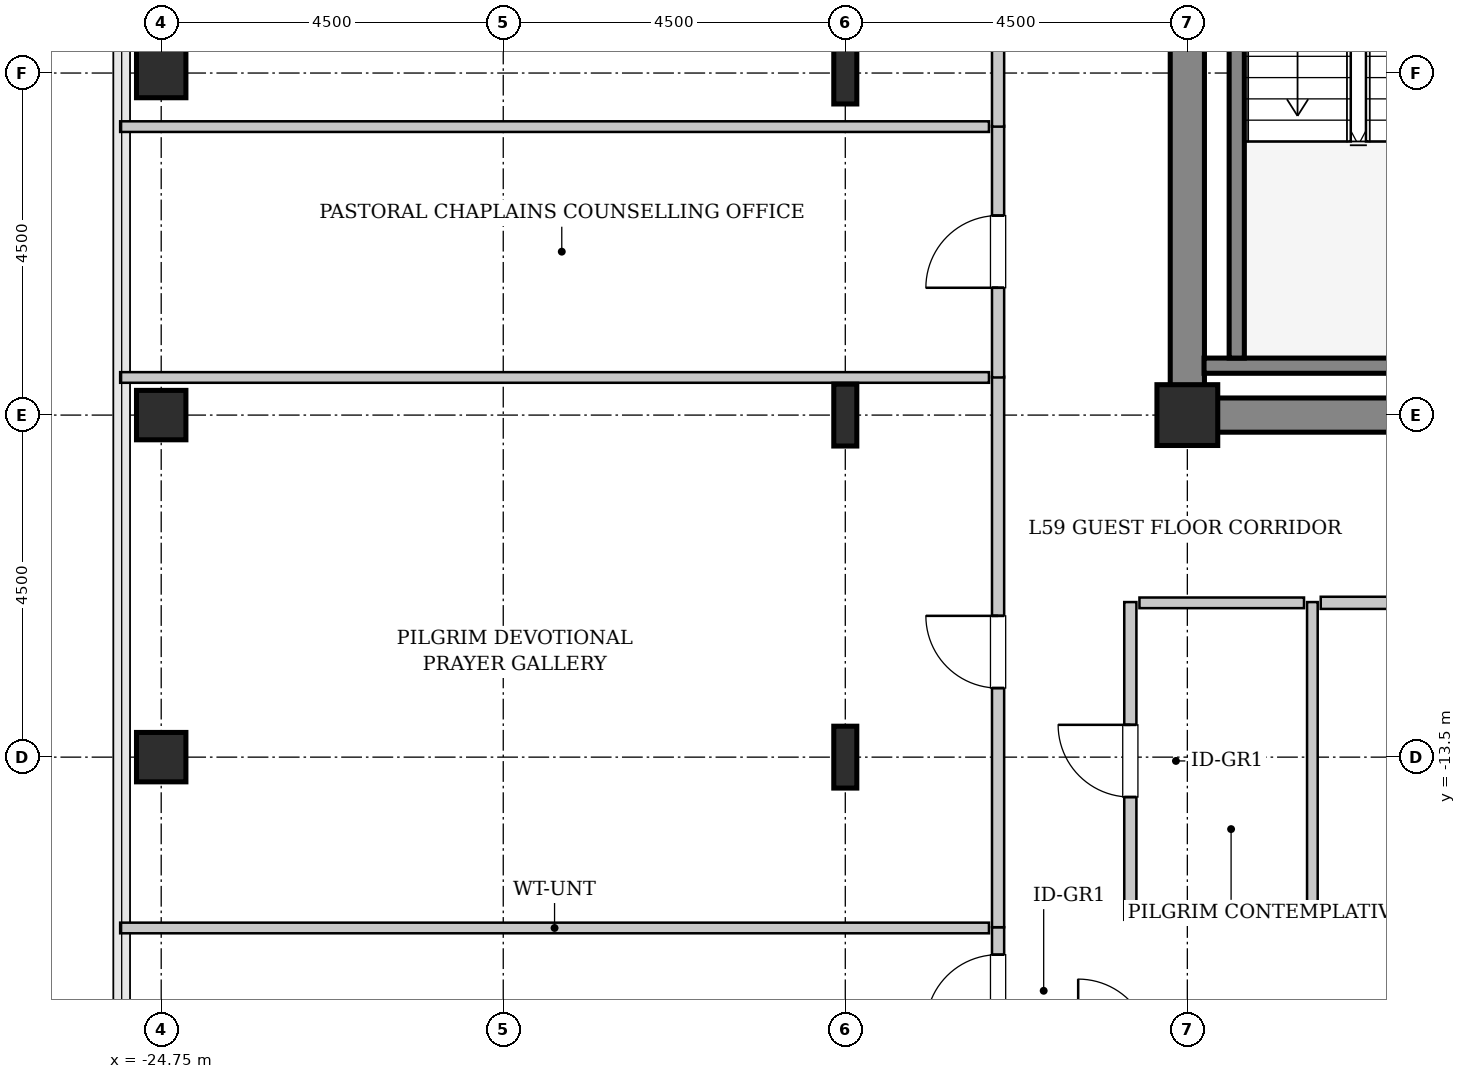
"""IFC4 building model, lengths in metres.
Left out: names, types, materials, properties, quantities, classifications, styles, units other than length and angle.
Written with IfcOpenShell. Run it as: python <this file> out.ifc"""

import sys

from ifc_helpers import new_model, si_unit, direction, frame, frame_2d, origin, origin_2d, place, context, subcontext, project, spatial, rectangle, hollow_rectangle, i_section, extrude, source, transform, mapped, element, fill, save


model = new_model("IFC4")
c1 = context("Model", 3, precision=1e-05, world=origin(), true_north=direction((0.0, 1.0)))
c2 = subcontext(c1, "Body", "Model", "MODEL_VIEW")
j1 = project(units=[si_unit("LENGTHUNIT", "METRE"), si_unit("PLANEANGLEUNIT", "RADIAN")], contexts=[c1])
p1 = place(None, origin())
s1 = spatial("IfcSite", under=j1, at=p1, CompositionType="ELEMENT")
p2 = place(p1, origin())
s2 = spatial("IfcBuilding", under=s1, at=p2, CompositionType="ELEMENT")
p3 = place(p2, frame((0.0, 0.0, 237.0)))
s3 = spatial("IfcBuildingStorey", under=s2, at=p3, CompositionType="ELEMENT", Elevation=237.0)
m1 = source(origin(), c2, "Body", "SweptSolid", [
    extrude(rectangle(XDim=9.925, YDim=0.45, at=frame_2d((4.962, 0.0))), origin(), (0.0, 0.0, 1.0), 3.8),
])
p4 = place(p3, frame((-11.475, -9.0, 0.0), z_axis=(0.0, 0.0, 1.0), x_axis=(1.0, 0.0, 0.0)))
e1 = element("IfcWall", 1, at=p4, inside=s3, PredefinedType="SHEAR", context=c2, shape_type="MappedRepresentation", body=[
    mapped(m1, transform((0.0, 0.0, 0.0), x_axis=(1.0, 0.0, 0.0), y_axis=(0.0, 1.0, 0.0), z_axis=(0.0, 0.0, 1.0), scale=1.0)),
])
m2 = source(origin(), c2, "Body", "SweptSolid", [
    extrude(rectangle(XDim=7.425, YDim=0.45, at=frame_2d((3.712, 0.0))), origin(), (0.0, 0.0, 1.0), 3.8),
])
p5 = place(p3, frame((-11.25, -8.775, 0.0), z_axis=(0.0, 0.0, 1.0), x_axis=(0.0, 1.0, 0.0)))
e2 = element("IfcWall", 2, at=p5, inside=s3, PredefinedType="SHEAR", context=c2, shape_type="MappedRepresentation", body=[
    mapped(m2, transform((0.0, 0.0, 0.0), x_axis=(1.0, 0.0, 0.0), y_axis=(0.0, 1.0, 0.0), z_axis=(0.0, 0.0, 1.0), scale=1.0)),
])
m3 = source(origin(), c2, "Body", "SweptSolid", [
    extrude(hollow_rectangle(XDim=0.65, YDim=0.65, WallThickness=0.032, InnerFilletRadius=0.032, OuterFilletRadius=0.064, at=origin_2d()), origin(), (0.0, 0.0, 1.0), 3.8),
])
for number, where, z_axis, x_axis in (
    (3, (-24.75, -13.5, 0.0), (0.0, 0.0, 1.0), (1.0, 0.0, 0.0)),
    (4, (-24.75, -9.0, 0.0), (0.0, 0.0, 1.0), (1.0, 0.0, 0.0)),
    (5, (-24.75, -4.5, 0.0), (0.0, 0.0, 1.0), (1.0, 0.0, 0.0)),
):
    element("IfcColumn", number, at=place(p3, frame(where, z_axis=z_axis, x_axis=x_axis)), inside=s3, PredefinedType="COLUMN", context=c2, shape_type="MappedRepresentation", body=[
        mapped(m3, transform((0.0, 0.0, 0.0), x_axis=(1.0, 0.0, 0.0), y_axis=(0.0, 1.0, 0.0), z_axis=(0.0, 0.0, 1.0), scale=1.0)),
    ])
m4 = source(origin(), c2, "Body", "SweptSolid", [
    extrude(i_section(OverallWidth=0.303, OverallDepth=0.814, WebThickness=0.021, FlangeThickness=0.04, FilletRadius=0.03, at=origin_2d()), origin(), (0.0, 0.0, 1.0), 3.8),
])
for number, where, z_axis, x_axis in (
    (6, (-15.75, -13.5, 0.0), (0.0, 0.0, 1.0), (1.0, 0.0, 0.0)),
    (7, (-15.75, -9.0, 0.0), (0.0, 0.0, 1.0), (1.0, 0.0, 0.0)),
    (8, (-15.75, -4.5, 0.0), (0.0, 0.0, 1.0), (1.0, 0.0, 0.0)),
):
    element("IfcColumn", number, at=place(p3, frame(where, z_axis=z_axis, x_axis=x_axis)), inside=s3, PredefinedType="COLUMN", context=c2, shape_type="MappedRepresentation", body=[
        mapped(m4, transform((0.0, 0.0, 0.0), x_axis=(1.0, 0.0, 0.0), y_axis=(0.0, 1.0, 0.0), z_axis=(0.0, 0.0, 1.0), scale=1.0)),
    ])
m5 = source(origin(), c2, "Body", "SweptSolid", [
    extrude(hollow_rectangle(XDim=0.8, YDim=0.8, WallThickness=0.04, InnerFilletRadius=0.04, OuterFilletRadius=0.08, at=origin_2d()), origin(), (0.0, 0.0, 1.0), 3.8),
])
p6 = place(p3, frame((-11.25, -9.0, 0.0), z_axis=(0.0, 0.0, 1.0), x_axis=(1.0, 0.0, 0.0)))
e9 = element("IfcColumn", 9, at=p6, inside=s3, PredefinedType="COLUMN", context=c2, shape_type="MappedRepresentation", body=[
    mapped(m5, transform((0.0, 0.0, 0.0), x_axis=(1.0, 0.0, 0.0), y_axis=(0.0, 1.0, 0.0), z_axis=(0.0, 0.0, 1.0), scale=1.0)),
])
m6 = source(origin(), c2, "Body", "SweptSolid", [
    extrude(rectangle(XDim=3.73, YDim=0.2, at=frame_2d((1.865, 0.0))), origin(), (0.0, 0.0, 1.0), 3.8),
])
p7 = place(p3, frame((-11.03, -8.35, 0.0), z_axis=(0.0, 0.0, 1.0), x_axis=(1.0, 0.0, 0.0)))
e10 = element("IfcWall", 10, at=p7, inside=s3, PredefinedType="SOLIDWALL", context=c2, shape_type="MappedRepresentation", body=[
    mapped(m6, transform((0.0, 0.0, 0.0), x_axis=(1.0, 0.0, 0.0), y_axis=(0.0, 1.0, 0.0), z_axis=(0.0, 0.0, 1.0), scale=1.0)),
])
m7 = source(origin(), c2, "Body", "SweptSolid", [
    extrude(rectangle(XDim=7.1, YDim=0.2, at=frame_2d((3.55, 0.0))), origin(), (0.0, 0.0, 1.0), 3.8),
])
p8 = place(p3, frame((-10.6, -1.15, 0.0), z_axis=(0.0, 0.0, 1.0), x_axis=(0.0, -1.0, 0.0)))
e11 = element("IfcWall", 11, at=p8, inside=s3, PredefinedType="SOLIDWALL", context=c2, shape_type="MappedRepresentation", body=[
    mapped(m7, transform((0.0, 0.0, 0.0), x_axis=(1.0, 0.0, 0.0), y_axis=(0.0, 1.0, 0.0), z_axis=(0.0, 0.0, 1.0), scale=1.0)),
])
m8 = source(origin(), c2, "Body", "SweptSolid", [
    extrude(rectangle(XDim=5.502, YDim=0.16, at=frame_2d((2.751, 0.0))), origin(), (0.0, 0.0, 1.0), 3.535),
])
p9 = place(p3, frame((-13.74, -21.24, 0.0), z_axis=(0.0, 0.0, 1.0), x_axis=(0.0, 1.0, 0.0)))
e12 = element("IfcWall", 12, at=p9, inside=s3, PredefinedType="PARTITIONING", context=c2, shape_type="MappedRepresentation", body=[
    mapped(m8, transform((0.0, 0.0, 0.0), x_axis=(1.0, 0.0, 0.0), y_axis=(0.0, 1.0, 0.0), z_axis=(0.0, 0.0, 1.0), scale=1.0)),
])
p10 = place(p9, frame((4.191, 0.0, 0.0)))
e13 = element("IfcOpeningElement", 13, at=p10, cuts=e12, PredefinedType="OPENING", context=c2, shape_type="SweptSolid", body=[
    extrude(rectangle(XDim=0.95, YDim=2.1, at=frame_2d((0.475, 1.05))), frame((0.0, 0.09, 0.0), z_axis=(0.0, -1.0, 0.0), x_axis=(1.0, 0.0, 0.0)), (0.0, 0.0, 1.0), 0.18),
])
m9 = source(origin(), c2, "Body", "SweptSolid", [
    extrude(rectangle(XDim=11.43, YDim=0.14, at=frame_2d((5.715, 0.0))), origin(), (0.0, 0.0, 1.0), 3.535),
])
p11 = place(p3, frame((-25.29, -15.748, 0.0), z_axis=(0.0, 0.0, 1.0), x_axis=(1.0, 0.0, 0.0)))
e14 = element("IfcWall", 14, at=p11, inside=s3, PredefinedType="PARTITIONING", context=c2, shape_type="MappedRepresentation", body=[
    mapped(m9, transform((0.0, 0.0, 0.0), x_axis=(1.0, 0.0, 0.0), y_axis=(0.0, 1.0, 0.0), z_axis=(0.0, 0.0, 1.0), scale=1.0)),
])
m10 = source(origin(), c2, "Body", "SweptSolid", [
    extrude(rectangle(XDim=7.242, YDim=0.16, at=frame_2d((3.621, 0.0))), origin(), (0.0, 0.0, 1.0), 3.535),
])
p12 = place(p3, frame((-13.74, -15.738, 0.0), z_axis=(0.0, 0.0, 1.0), x_axis=(0.0, 1.0, 0.0)))
e15 = element("IfcWall", 15, at=p12, inside=s3, PredefinedType="PARTITIONING", context=c2, shape_type="MappedRepresentation", body=[
    mapped(m10, transform((0.0, 0.0, 0.0), x_axis=(1.0, 0.0, 0.0), y_axis=(0.0, 1.0, 0.0), z_axis=(0.0, 0.0, 1.0), scale=1.0)),
])
p13 = place(p12, frame((3.146, 0.0, 0.0)))
e16 = element("IfcOpeningElement", 16, at=p13, cuts=e15, PredefinedType="OPENING", context=c2, shape_type="SweptSolid", body=[
    extrude(rectangle(XDim=0.95, YDim=2.1, at=frame_2d((0.475, 1.05))), frame((0.0, 0.09, 0.0), z_axis=(0.0, -1.0, 0.0), x_axis=(1.0, 0.0, 0.0)), (0.0, 0.0, 1.0), 0.18),
])
m11 = source(origin(), c2, "Body", "SweptSolid", [
    extrude(rectangle(XDim=11.43, YDim=0.14, at=frame_2d((5.715, 0.0))), origin(), (0.0, 0.0, 1.0), 2.925),
])
p14 = place(p3, frame((-25.29, -8.505, 0.0), z_axis=(0.0, 0.0, 1.0), x_axis=(1.0, 0.0, 0.0)))
e17 = element("IfcWall", 17, at=p14, inside=s3, PredefinedType="PARTITIONING", context=c2, shape_type="MappedRepresentation", body=[
    mapped(m11, transform((0.0, 0.0, 0.0), x_axis=(1.0, 0.0, 0.0), y_axis=(0.0, 1.0, 0.0), z_axis=(0.0, 0.0, 1.0), scale=1.0)),
])
m12 = source(origin(), c2, "Body", "SweptSolid", [
    extrude(rectangle(XDim=3.31, YDim=0.16, at=frame_2d((1.655, 0.0))), origin(), (0.0, 0.0, 1.0), 3.535),
])
p15 = place(p3, frame((-13.74, -8.505, 0.0), z_axis=(0.0, 0.0, 1.0), x_axis=(0.0, 1.0, 0.0)))
e18 = element("IfcWall", 18, at=p15, inside=s3, PredefinedType="PARTITIONING", context=c2, shape_type="MappedRepresentation", body=[
    mapped(m12, transform((0.0, 0.0, 0.0), x_axis=(1.0, 0.0, 0.0), y_axis=(0.0, 1.0, 0.0), z_axis=(0.0, 0.0, 1.0), scale=1.0)),
])
p16 = place(p15, frame((1.18, 0.0, 0.0)))
e19 = element("IfcOpeningElement", 19, at=p16, cuts=e18, PredefinedType="OPENING", context=c2, shape_type="SweptSolid", body=[
    extrude(rectangle(XDim=0.95, YDim=2.1, at=frame_2d((0.475, 1.05))), frame((0.0, 0.09, 0.0), z_axis=(0.0, -1.0, 0.0), x_axis=(1.0, 0.0, 0.0)), (0.0, 0.0, 1.0), 0.18),
])
p17 = place(p3, frame((-25.29, -5.205, 0.0), z_axis=(0.0, 0.0, 1.0), x_axis=(1.0, 0.0, 0.0)))
e20 = element("IfcWall", 20, at=p17, inside=s3, PredefinedType="PARTITIONING", context=c2, shape_type="MappedRepresentation", body=[
    mapped(m9, transform((0.0, 0.0, 0.0), x_axis=(1.0, 0.0, 0.0), y_axis=(0.0, 1.0, 0.0), z_axis=(0.0, 0.0, 1.0), scale=1.0)),
])
m13 = source(origin(), c2, "Body", "SweptSolid", [
    extrude(rectangle(XDim=10.31, YDim=0.16, at=frame_2d((5.155, 0.0))), origin(), (0.0, 0.0, 1.0), 3.535),
])
p18 = place(p3, frame((-13.74, -5.205, 0.0), z_axis=(0.0, 0.0, 1.0), x_axis=(0.0, 1.0, 0.0)))
e21 = element("IfcWall", 21, at=p18, inside=s3, PredefinedType="PARTITIONING", context=c2, shape_type="MappedRepresentation", body=[
    mapped(m13, transform((0.0, 0.0, 0.0), x_axis=(1.0, 0.0, 0.0), y_axis=(0.0, 1.0, 0.0), z_axis=(0.0, 0.0, 1.0), scale=1.0)),
])
p19 = place(p18, frame((4.68, 0.0, 0.0)))
e22 = element("IfcOpeningElement", 22, at=p19, cuts=e21, PredefinedType="OPENING", context=c2, shape_type="SweptSolid", body=[
    extrude(rectangle(XDim=0.95, YDim=2.1, at=frame_2d((0.475, 1.05))), frame((0.0, 0.09, 0.0), z_axis=(0.0, -1.0, 0.0), x_axis=(1.0, 0.0, 0.0)), (0.0, 0.0, 1.0), 0.18),
])
m14 = source(origin(), c2, "Body", "SweptSolid", [
    extrude(rectangle(XDim=4.18, YDim=0.16, at=frame_2d((2.09, 0.0))), origin(), (0.0, 0.0, 1.0), 3.535),
])
p20 = place(p3, frame((-12.0, -15.64, 0.0), z_axis=(0.0, 0.0, 1.0), x_axis=(0.0, 1.0, 0.0)))
e23 = element("IfcWall", 23, at=p20, inside=s3, PredefinedType="PARTITIONING", context=c2, shape_type="MappedRepresentation", body=[
    mapped(m14, transform((0.0, 0.0, 0.0), x_axis=(1.0, 0.0, 0.0), y_axis=(0.0, 1.0, 0.0), z_axis=(0.0, 0.0, 1.0), scale=1.0)),
])
p21 = place(p20, frame((1.615, 0.0, 0.0)))
e24 = element("IfcOpeningElement", 24, at=p21, cuts=e23, PredefinedType="OPENING", context=c2, shape_type="SweptSolid", body=[
    extrude(rectangle(XDim=0.95, YDim=2.1, at=frame_2d((0.475, 1.05))), frame((0.0, 0.09, 0.0), z_axis=(0.0, -1.0, 0.0), x_axis=(1.0, 0.0, 0.0)), (0.0, 0.0, 1.0), 0.18),
])
m15 = source(origin(), c2, "Body", "SweptSolid", [
    extrude(rectangle(XDim=4.18, YDim=0.14, at=frame_2d((2.09, 0.0))), origin(), (0.0, 0.0, 1.0), 3.535),
])
p22 = place(p3, frame((-9.605, -15.64, 0.0), z_axis=(0.0, 0.0, 1.0), x_axis=(0.0, 1.0, 0.0)))
e25 = element("IfcWall", 25, at=p22, inside=s3, PredefinedType="PARTITIONING", context=c2, shape_type="MappedRepresentation", body=[
    mapped(m15, transform((0.0, 0.0, 0.0), x_axis=(1.0, 0.0, 0.0), y_axis=(0.0, 1.0, 0.0), z_axis=(0.0, 0.0, 1.0), scale=1.0)),
])
m16 = source(origin(), c2, "Body", "SweptSolid", [
    extrude(rectangle(XDim=2.165, YDim=0.14, at=frame_2d((1.083, 0.0))), origin(), (0.0, 0.0, 1.0), 3.535),
])
for number, where, z_axis, x_axis in (
    (26, (-11.88, -11.47, 0.0), (0.0, 0.0, 1.0), (1.0, 0.0, 0.0)),
    (27, (-11.88, -15.63, 0.0), (0.0, 0.0, 1.0), (1.0, 0.0, 0.0)),
):
    element("IfcWall", number, at=place(p3, frame(where, z_axis=z_axis, x_axis=x_axis)), inside=s3, PredefinedType="PARTITIONING", context=c2, shape_type="MappedRepresentation", body=[
        mapped(m16, transform((0.0, 0.0, 0.0), x_axis=(1.0, 0.0, 0.0), y_axis=(0.0, 1.0, 0.0), z_axis=(0.0, 0.0, 1.0), scale=1.0)),
    ])
m17 = source(origin(), c2, "Body", "SweptSolid", [
    extrude(rectangle(XDim=4.5, YDim=0.16, at=frame_2d((2.25, 0.0))), origin(), (0.0, 0.0, 1.0), 3.535),
])
p23 = place(p3, frame((-9.495, -11.47, 0.0), z_axis=(0.0, 0.0, 1.0), x_axis=(1.0, 0.0, 0.0)))
e28 = element("IfcWall", 28, at=p23, inside=s3, PredefinedType="PARTITIONING", context=c2, shape_type="MappedRepresentation", body=[
    mapped(m17, transform((0.0, 0.0, 0.0), x_axis=(1.0, 0.0, 0.0), y_axis=(0.0, 1.0, 0.0), z_axis=(0.0, 0.0, 1.0), scale=1.0)),
])
p24 = place(p23, frame((1.775, 0.0, 0.0)))
e29 = element("IfcOpeningElement", 29, at=p24, cuts=e28, PredefinedType="OPENING", context=c2, shape_type="SweptSolid", body=[
    extrude(rectangle(XDim=0.95, YDim=2.1, at=frame_2d((0.475, 1.05))), frame((0.0, 0.09, 0.0), z_axis=(0.0, -1.0, 0.0), x_axis=(1.0, 0.0, 0.0)), (0.0, 0.0, 1.0), 0.18),
])
m18 = source(origin(), c2, "Body", "SweptSolid", [
    extrude(rectangle(XDim=4.5, YDim=0.14, at=frame_2d((2.25, 0.0))), origin(), (0.0, 0.0, 1.0), 3.535),
])
p25 = place(p3, frame((-9.495, -15.63, 0.0), z_axis=(0.0, 0.0, 1.0), x_axis=(1.0, 0.0, 0.0)))
e30 = element("IfcWall", 30, at=p25, inside=s3, PredefinedType="PARTITIONING", context=c2, shape_type="MappedRepresentation", body=[
    mapped(m18, transform((0.0, 0.0, 0.0), x_axis=(1.0, 0.0, 0.0), y_axis=(0.0, 1.0, 0.0), z_axis=(0.0, 0.0, 1.0), scale=1.0)),
])
m19 = source(origin(), c2, "Body", "SweptSolid", [
    extrude(rectangle(XDim=0.95, YDim=2.1, at=frame_2d((0.475, 1.05))), frame((0.0, 0.025, 0.0), z_axis=(0.0, -1.0, 0.0), x_axis=(1.0, 0.0, 0.0)), (0.0, 0.0, 1.0), 0.05),
])
p26 = place(p10, origin())
e31 = element("IfcDoor", 31, at=p26, inside=s3, OperationType="SINGLE_SWING_LEFT", PredefinedType="DOOR", context=c2, shape_type="MappedRepresentation", body=[
    mapped(m19, transform((0.0, 0.0, 0.0), x_axis=(1.0, 0.0, 0.0), y_axis=(0.0, 1.0, 0.0), z_axis=(0.0, 0.0, 1.0), scale=1.0)),
])
fill(e13, e31)
p27 = place(p13, origin())
e32 = element("IfcDoor", 32, at=p27, inside=s3, OperationType="SINGLE_SWING_RIGHT", PredefinedType="DOOR", context=c2, shape_type="MappedRepresentation", body=[
    mapped(m19, transform((0.0, 0.0, 0.0), x_axis=(1.0, 0.0, 0.0), y_axis=(0.0, 1.0, 0.0), z_axis=(0.0, 0.0, 1.0), scale=1.0)),
])
fill(e16, e32)
p28 = place(p16, origin())
e33 = element("IfcDoor", 33, at=p28, inside=s3, OperationType="SINGLE_SWING_LEFT", PredefinedType="DOOR", context=c2, shape_type="MappedRepresentation", body=[
    mapped(m19, transform((0.0, 0.0, 0.0), x_axis=(1.0, 0.0, 0.0), y_axis=(0.0, 1.0, 0.0), z_axis=(0.0, 0.0, 1.0), scale=1.0)),
])
fill(e19, e33)
p29 = place(p21, origin())
e34 = element("IfcDoor", 34, at=p29, inside=s3, OperationType="SINGLE_SWING_RIGHT", PredefinedType="DOOR", context=c2, shape_type="MappedRepresentation", body=[
    mapped(m19, transform((0.0, 0.0, 0.0), x_axis=(1.0, 0.0, 0.0), y_axis=(0.0, 1.0, 0.0), z_axis=(0.0, 0.0, 1.0), scale=1.0)),
])
fill(e24, e34)
save(model, sys.argv[1])
